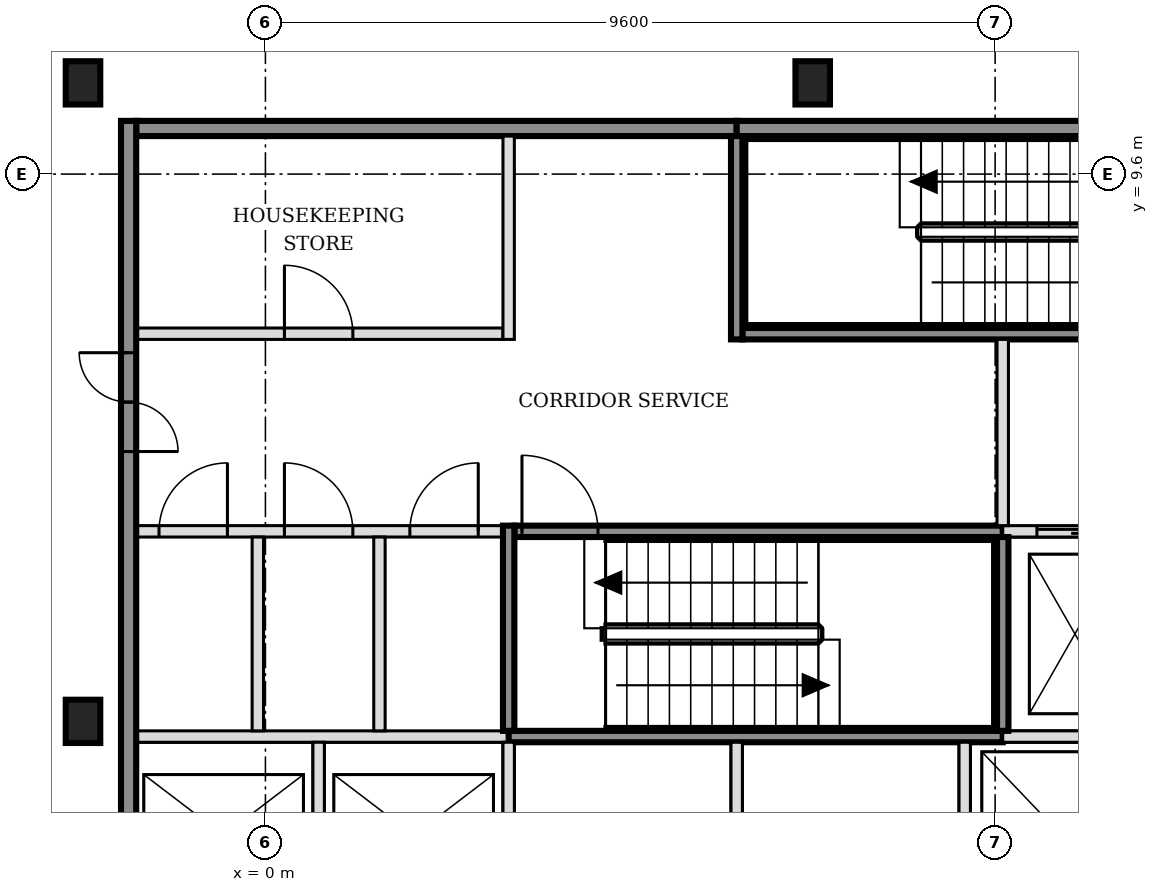
"""IFC4 building model, lengths in metres.
Left out: names, types, materials, properties, quantities, classifications, styles, units other than length and angle.
Written with IfcOpenShell. Run it as: python <this file> out.ifc"""

import sys

from ifc_helpers import new_model, si_unit, direction, frame, frame_2d, origin, origin_2d, place, context, subcontext, project, spatial, rectangle, i_section, extrude, element, fill, save


model = new_model("IFC4")
c1 = context("Model", 3, precision=1e-05, world=origin(), true_north=direction((0.0, 1.0)))
c2 = subcontext(c1, "Body", "Model", "MODEL_VIEW")
j1 = project(units=[si_unit("LENGTHUNIT", "METRE"), si_unit("PLANEANGLEUNIT", "RADIAN")], contexts=[c1])
p1 = place(None, origin())
s1 = spatial("IfcSite", under=j1, at=p1, CompositionType="ELEMENT")
p2 = place(p1, origin())
s2 = spatial("IfcBuilding", under=s1, at=p2, CompositionType="ELEMENT")
p3 = place(p2, frame((0.0, 0.0, 47.4)))
s3 = spatial("IfcBuildingStorey", under=s2, at=p3, CompositionType="ELEMENT", Elevation=47.4)
for number, where, z_axis, x_axis in (
    (1, (-2.4, 2.4, -0.15), (0.0, 0.0, 1.0), (1.0, 0.0, 0.0)),
    (2, (-2.4, 10.8, -0.15), (0.0, 0.0, 1.0), (1.0, 0.0, 0.0)),
    (3, (7.2, 10.8, -0.15), (0.0, 0.0, 1.0), (1.0, 0.0, 0.0)),
):
    element("IfcColumn", number, at=place(p3, frame(where, z_axis=z_axis, x_axis=x_axis)), inside=s3, PredefinedType="COLUMN", context=c2, shape_type="SweptSolid", body=[
        extrude(i_section(OverallWidth=0.454, OverallDepth=0.569, WebThickness=0.078, FlangeThickness=0.125, FilletRadius=0.015, at=origin_2d()), origin(), (0.0, 0.0, 1.0), 3.6),
    ])
p4 = place(p3, frame((-1.7, 2.2, 0.0), z_axis=(0.0, 0.0, 1.0), x_axis=(1.0, 0.0, 0.0)))
e4 = element("IfcWall", 4, at=p4, inside=s3, PredefinedType="SOLIDWALL", context=c2, shape_type="SweptSolid", body=[
    extrude(rectangle(XDim=4.9, YDim=0.15, at=frame_2d((2.45, 0.0))), origin(), (0.0, 0.0, 1.0), 3.45),
])
p5 = place(p3, frame((3.2, 2.2, 0.0), z_axis=(0.0, 0.0, 1.0), x_axis=(1.0, 0.0, 0.0)))
e5 = element("IfcWall", 5, at=p5, inside=s3, PredefinedType="SOLIDWALL", context=c2, shape_type="SweptSolid", body=[
    extrude(rectangle(XDim=6.5, YDim=0.15, at=frame_2d((3.25, 0.0))), origin(), (0.0, 0.0, 1.0), 3.45),
])
p6 = place(p3, frame((9.7, 2.2, 0.0), z_axis=(0.0, 0.0, 1.0), x_axis=(1.0, 0.0, 0.0)))
e6 = element("IfcWall", 6, at=p6, inside=s3, PredefinedType="SOLIDWALL", context=c2, shape_type="SweptSolid", body=[
    extrude(rectangle(XDim=4.525, YDim=0.15, at=frame_2d((2.263, 0.0))), origin(), (0.0, 0.0, 1.0), 3.45),
])
p7 = place(p3, frame((-1.7, 4.9, 0.0), z_axis=(0.0, 0.0, 1.0), x_axis=(1.0, 0.0, 0.0)))
e7 = element("IfcWall", 7, at=p7, inside=s3, PredefinedType="PARTITIONING", context=c2, shape_type="SweptSolid", body=[
    extrude(rectangle(XDim=4.825, YDim=0.15, at=frame_2d((2.413, 0.0))), origin(), (0.0, 0.0, 1.0), 3.45),
])
p8 = place(p7, frame((0.3, 0.0, 0.0)))
e8 = element("IfcOpeningElement", 8, at=p8, cuts=e7, PredefinedType="OPENING", context=c2, shape_type="SweptSolid", body=[
    extrude(rectangle(XDim=0.9, YDim=2.1, at=frame_2d((0.45, 1.05))), frame((0.0, 0.085, 0.0), z_axis=(0.0, -1.0, 0.0), x_axis=(1.0, 0.0, 0.0)), (0.0, 0.0, 1.0), 0.17),
])
p9 = place(p7, frame((1.95, 0.0, 0.0)))
e9 = element("IfcOpeningElement", 9, at=p9, cuts=e7, PredefinedType="OPENING", context=c2, shape_type="SweptSolid", body=[
    extrude(rectangle(XDim=0.9, YDim=2.1, at=frame_2d((0.45, 1.05))), frame((0.0, 0.085, 0.0), z_axis=(0.0, -1.0, 0.0), x_axis=(1.0, 0.0, 0.0)), (0.0, 0.0, 1.0), 0.17),
])
p10 = place(p7, frame((3.6, 0.0, 0.0)))
e10 = element("IfcOpeningElement", 10, at=p10, cuts=e7, PredefinedType="OPENING", context=c2, shape_type="SweptSolid", body=[
    extrude(rectangle(XDim=0.9, YDim=2.1, at=frame_2d((0.45, 1.05))), frame((0.0, 0.085, 0.0), z_axis=(0.0, -1.0, 0.0), x_axis=(1.0, 0.0, 0.0)), (0.0, 0.0, 1.0), 0.17),
])
p11 = place(p3, frame((3.275, 4.9, 0.0), z_axis=(0.0, 0.0, 1.0), x_axis=(1.0, 0.0, 0.0)))
e11 = element("IfcWall", 11, at=p11, inside=s3, PredefinedType="SOLIDWALL", context=c2, shape_type="SweptSolid", body=[
    extrude(rectangle(XDim=6.425, YDim=0.15, at=frame_2d((3.212, 0.0))), origin(), (0.0, 0.0, 1.0), 3.45),
])
p12 = place(p11, frame((0.1, 0.0, 0.0)))
e12 = element("IfcOpeningElement", 12, at=p12, cuts=e11, PredefinedType="OPENING", context=c2, shape_type="SweptSolid", body=[
    extrude(rectangle(XDim=1.0, YDim=2.1, at=frame_2d((0.5, 1.05))), frame((0.0, 0.085, 0.0), z_axis=(0.0, -1.0, 0.0), x_axis=(1.0, 0.0, 0.0)), (0.0, 0.0, 1.0), 0.17),
])
p13 = place(p3, frame((9.7, 4.9, 0.0), z_axis=(0.0, 0.0, 1.0), x_axis=(1.0, 0.0, 0.0)))
e13 = element("IfcWall", 13, at=p13, inside=s3, PredefinedType="SOLIDWALL", context=c2, shape_type="SweptSolid", body=[
    extrude(rectangle(XDim=6.4, YDim=0.15, at=frame_2d((3.2, 0.0))), origin(), (0.0, 0.0, 1.0), 3.45),
])
p14 = place(p13, frame((0.45, 0.0, 0.0)))
e14 = element("IfcOpeningElement", 14, at=p14, cuts=e13, PredefinedType="OPENING", context=c2, shape_type="SweptSolid", body=[
    extrude(rectangle(XDim=1.0, YDim=2.1, at=frame_2d((0.5, 1.05))), frame((0.0, 0.085, 0.0), z_axis=(0.0, -1.0, 0.0), x_axis=(1.0, 0.0, 0.0)), (0.0, 0.0, 1.0), 0.17),
])
p15 = place(p13, frame((2.35, 0.0, 0.0)))
e15 = element("IfcOpeningElement", 15, at=p15, cuts=e13, PredefinedType="OPENING", context=c2, shape_type="SweptSolid", body=[
    extrude(rectangle(XDim=1.0, YDim=2.1, at=frame_2d((0.5, 1.05))), frame((0.0, 0.085, 0.0), z_axis=(0.0, -1.0, 0.0), x_axis=(1.0, 0.0, 0.0)), (0.0, 0.0, 1.0), 0.17),
])
p16 = place(p13, frame((4.7, 0.0, 0.0)))
e16 = element("IfcOpeningElement", 16, at=p16, cuts=e13, PredefinedType="OPENING", context=c2, shape_type="SweptSolid", body=[
    extrude(rectangle(XDim=0.9, YDim=2.1, at=frame_2d((0.45, 1.05))), frame((0.0, 0.085, 0.0), z_axis=(0.0, -1.0, 0.0), x_axis=(1.0, 0.0, 0.0)), (0.0, 0.0, 1.0), 0.17),
])
p17 = place(p3, frame((-1.7, 7.5, 0.0), z_axis=(0.0, 0.0, 1.0), x_axis=(1.0, 0.0, 0.0)))
e17 = element("IfcWall", 17, at=p17, inside=s3, PredefinedType="PARTITIONING", context=c2, shape_type="SweptSolid", body=[
    extrude(rectangle(XDim=4.825, YDim=0.15, at=frame_2d((2.413, 0.0))), origin(), (0.0, 0.0, 1.0), 3.45),
])
p18 = place(p17, frame((1.95, 0.0, 0.0)))
e18 = element("IfcOpeningElement", 18, at=p18, cuts=e17, PredefinedType="OPENING", context=c2, shape_type="SweptSolid", body=[
    extrude(rectangle(XDim=0.9, YDim=2.1, at=frame_2d((0.45, 1.05))), frame((0.0, 0.085, 0.0), z_axis=(0.0, -1.0, 0.0), x_axis=(1.0, 0.0, 0.0)), (0.0, 0.0, 1.0), 0.17),
])
p19 = place(p3, frame((6.275, 7.5, 0.0), z_axis=(0.0, 0.0, 1.0), x_axis=(1.0, 0.0, 0.0)))
e19 = element("IfcWall", 19, at=p19, inside=s3, PredefinedType="SOLIDWALL", context=c2, shape_type="SweptSolid", body=[
    extrude(rectangle(XDim=6.425, YDim=0.15, at=frame_2d((3.212, 0.0))), origin(), (0.0, 0.0, 1.0), 3.45),
])
p20 = place(p19, frame((5.225, 0.0, 0.0)))
e20 = element("IfcOpeningElement", 20, at=p20, cuts=e19, PredefinedType="OPENING", context=c2, shape_type="SweptSolid", body=[
    extrude(rectangle(XDim=1.0, YDim=2.1, at=frame_2d((0.5, 1.05))), frame((0.0, 0.085, 0.0), z_axis=(0.0, -1.0, 0.0), x_axis=(1.0, 0.0, 0.0)), (0.0, 0.0, 1.0), 0.17),
])
p21 = place(p3, frame((-1.7, 10.2, 0.0), z_axis=(0.0, 0.0, 1.0), x_axis=(1.0, 0.0, 0.0)))
e21 = element("IfcWall", 21, at=p21, inside=s3, PredefinedType="SOLIDWALL", context=c2, shape_type="SweptSolid", body=[
    extrude(rectangle(XDim=7.9, YDim=0.2, at=frame_2d((3.95, 0.0))), origin(), (0.0, 0.0, 1.0), 3.45),
])
p22 = place(p3, frame((6.2, 10.2, 0.0), z_axis=(0.0, 0.0, 1.0), x_axis=(1.0, 0.0, 0.0)))
e22 = element("IfcWall", 22, at=p22, inside=s3, PredefinedType="SOLIDWALL", context=c2, shape_type="SweptSolid", body=[
    extrude(rectangle(XDim=6.5, YDim=0.2, at=frame_2d((3.25, 0.0))), origin(), (0.0, 0.0, 1.0), 3.45),
])
p23 = place(p3, frame((-1.8, -5.5, 0.0), z_axis=(0.0, 0.0, 1.0), x_axis=(0.0, 1.0, 0.0)))
e23 = element("IfcWall", 23, at=p23, inside=s3, PredefinedType="SOLIDWALL", context=c2, shape_type="SweptSolid", body=[
    extrude(rectangle(XDim=15.8, YDim=0.2, at=frame_2d((7.9, 0.0))), origin(), (0.0, 0.0, 1.0), 3.45),
])
p24 = place(p23, frame((3.05, 0.0, 0.0)))
e24 = element("IfcOpeningElement", 24, at=p24, cuts=e23, PredefinedType="OPENING", context=c2, shape_type="SweptSolid", body=[
    extrude(rectangle(XDim=1.3, YDim=2.1, at=frame_2d((0.65, 1.05))), frame((0.0, 0.11, 0.0), z_axis=(0.0, -1.0, 0.0), x_axis=(1.0, 0.0, 0.0)), (0.0, 0.0, 1.0), 0.22),
])
p25 = place(p23, frame((11.45, 0.0, 0.0)))
e25 = element("IfcOpeningElement", 25, at=p25, cuts=e23, PredefinedType="OPENING", context=c2, shape_type="SweptSolid", body=[
    extrude(rectangle(XDim=1.3, YDim=2.1, at=frame_2d((0.65, 1.05))), frame((0.0, 0.11, 0.0), z_axis=(0.0, -1.0, 0.0), x_axis=(1.0, 0.0, 0.0)), (0.0, 0.0, 1.0), 0.22),
])
p26 = place(p3, frame((-0.1, 2.275, 0.0), z_axis=(0.0, 0.0, 1.0), x_axis=(0.0, 1.0, 0.0)))
e26 = element("IfcWall", 26, at=p26, inside=s3, PredefinedType="PARTITIONING", context=c2, shape_type="SweptSolid", body=[
    extrude(rectangle(XDim=2.55, YDim=0.15, at=frame_2d((1.275, 0.0))), origin(), (0.0, 0.0, 1.0), 3.45),
])
p27 = place(p3, frame((0.7, -0.325, 0.0), z_axis=(0.0, 0.0, 1.0), x_axis=(0.0, 1.0, 0.0)))
e27 = element("IfcWall", 27, at=p27, inside=s3, PredefinedType="SOLIDWALL", context=c2, shape_type="SweptSolid", body=[
    extrude(rectangle(XDim=2.45, YDim=0.15, at=frame_2d((1.225, 0.0))), origin(), (0.0, 0.0, 1.0), 3.45),
])
p28 = place(p3, frame((1.5, 2.275, 0.0), z_axis=(0.0, 0.0, 1.0), x_axis=(0.0, 1.0, 0.0)))
e28 = element("IfcWall", 28, at=p28, inside=s3, PredefinedType="PARTITIONING", context=c2, shape_type="SweptSolid", body=[
    extrude(rectangle(XDim=2.55, YDim=0.15, at=frame_2d((1.275, 0.0))), origin(), (0.0, 0.0, 1.0), 3.45),
])
p29 = place(p3, frame((3.2, -0.325, 0.0), z_axis=(0.0, 0.0, 1.0), x_axis=(0.0, 1.0, 0.0)))
e29 = element("IfcWall", 29, at=p29, inside=s3, PredefinedType="SOLIDWALL", context=c2, shape_type="SweptSolid", body=[
    extrude(rectangle(XDim=2.45, YDim=0.15, at=frame_2d((1.225, 0.0))), origin(), (0.0, 0.0, 1.0), 3.45),
])
p30 = place(p3, frame((3.2, 2.275, 0.0), z_axis=(0.0, 0.0, 1.0), x_axis=(0.0, 1.0, 0.0)))
e30 = element("IfcWall", 30, at=p30, inside=s3, PredefinedType="SOLIDWALL", context=c2, shape_type="SweptSolid", body=[
    extrude(rectangle(XDim=2.7, YDim=0.15, at=frame_2d((1.35, 0.0))), origin(), (0.0, 0.0, 1.0), 3.45),
])
p31 = place(p3, frame((3.2, 7.425, 0.0), z_axis=(0.0, 0.0, 1.0), x_axis=(0.0, 1.0, 0.0)))
e31 = element("IfcWall", 31, at=p31, inside=s3, PredefinedType="PARTITIONING", context=c2, shape_type="SweptSolid", body=[
    extrude(rectangle(XDim=2.675, YDim=0.15, at=frame_2d((1.337, 0.0))), origin(), (0.0, 0.0, 1.0), 3.45),
])
p32 = place(p3, frame((6.2, -0.325, 0.0), z_axis=(0.0, 0.0, 1.0), x_axis=(0.0, 1.0, 0.0)))
e32 = element("IfcWall", 32, at=p32, inside=s3, PredefinedType="SOLIDWALL", context=c2, shape_type="SweptSolid", body=[
    extrude(rectangle(XDim=2.45, YDim=0.15, at=frame_2d((1.225, 0.0))), origin(), (0.0, 0.0, 1.0), 3.45),
])
p33 = place(p3, frame((6.2, 7.425, 0.0), z_axis=(0.0, 0.0, 1.0), x_axis=(0.0, 1.0, 0.0)))
e33 = element("IfcWall", 33, at=p33, inside=s3, PredefinedType="SOLIDWALL", context=c2, shape_type="SweptSolid", body=[
    extrude(rectangle(XDim=2.675, YDim=0.15, at=frame_2d((1.337, 0.0))), origin(), (0.0, 0.0, 1.0), 3.45),
])
p34 = place(p3, frame((9.2, -0.325, 0.0), z_axis=(0.0, 0.0, 1.0), x_axis=(0.0, 1.0, 0.0)))
e34 = element("IfcWall", 34, at=p34, inside=s3, PredefinedType="SOLIDWALL", context=c2, shape_type="SweptSolid", body=[
    extrude(rectangle(XDim=2.45, YDim=0.15, at=frame_2d((1.225, 0.0))), origin(), (0.0, 0.0, 1.0), 3.45),
])
p35 = place(p3, frame((9.7, 2.275, 0.0), z_axis=(0.0, 0.0, 1.0), x_axis=(0.0, 1.0, 0.0)))
e35 = element("IfcWall", 35, at=p35, inside=s3, PredefinedType="SOLIDWALL", context=c2, shape_type="SweptSolid", body=[
    extrude(rectangle(XDim=2.55, YDim=0.15, at=frame_2d((1.275, 0.0))), origin(), (0.0, 0.0, 1.0), 3.45),
])
p36 = place(p3, frame((9.7, 4.975, 0.0), z_axis=(0.0, 0.0, 1.0), x_axis=(0.0, 1.0, 0.0)))
e36 = element("IfcWall", 36, at=p36, inside=s3, PredefinedType="SOLIDWALL", context=c2, shape_type="SweptSolid", body=[
    extrude(rectangle(XDim=2.45, YDim=0.15, at=frame_2d((1.225, 0.0))), origin(), (0.0, 0.0, 1.0), 3.45),
])
p37 = place(p14, origin())
e37 = element("IfcDoor", 37, at=p37, inside=s3, OperationType="DOUBLE_DOOR_SLIDING", PredefinedType="DOOR", context=c2, shape_type="SweptSolid", body=[
    extrude(rectangle(XDim=1.0, YDim=2.1, at=frame_2d((0.5, 1.05))), frame((0.0, 0.025, 0.0), z_axis=(0.0, -1.0, 0.0), x_axis=(1.0, 0.0, 0.0)), (0.0, 0.0, 1.0), 0.05),
])
fill(e14, e37)
p38 = place(p12, origin())
e38 = element("IfcDoor", 38, at=p38, inside=s3, OperationType="SINGLE_SWING_LEFT", PredefinedType="DOOR", context=c2, shape_type="SweptSolid", body=[
    extrude(rectangle(XDim=1.0, YDim=2.1, at=frame_2d((0.5, 1.05))), frame((0.0, 0.025, 0.0), z_axis=(0.0, -1.0, 0.0), x_axis=(1.0, 0.0, 0.0)), (0.0, 0.0, 1.0), 0.05),
])
fill(e12, e38)
p39 = place(p25, origin())
e39 = element("IfcDoor", 39, at=p39, inside=s3, OperationType="DOUBLE_DOOR_SINGLE_SWING", PredefinedType="DOOR", context=c2, shape_type="SweptSolid", body=[
    extrude(rectangle(XDim=1.3, YDim=2.1, at=frame_2d((0.65, 1.05))), frame((0.0, 0.025, 0.0), z_axis=(0.0, -1.0, 0.0), x_axis=(1.0, 0.0, 0.0)), (0.0, 0.0, 1.0), 0.05),
])
fill(e25, e39)
p40 = place(p8, origin())
e40 = element("IfcDoor", 40, at=p40, inside=s3, OperationType="SINGLE_SWING_RIGHT", PredefinedType="DOOR", context=c2, shape_type="SweptSolid", body=[
    extrude(rectangle(XDim=0.9, YDim=2.1, at=frame_2d((0.45, 1.05))), frame((0.0, 0.025, 0.0), z_axis=(0.0, -1.0, 0.0), x_axis=(1.0, 0.0, 0.0)), (0.0, 0.0, 1.0), 0.05),
])
fill(e8, e40)
p41 = place(p9, origin())
e41 = element("IfcDoor", 41, at=p41, inside=s3, OperationType="SINGLE_SWING_LEFT", PredefinedType="DOOR", context=c2, shape_type="SweptSolid", body=[
    extrude(rectangle(XDim=0.9, YDim=2.1, at=frame_2d((0.45, 1.05))), frame((0.0, 0.025, 0.0), z_axis=(0.0, -1.0, 0.0), x_axis=(1.0, 0.0, 0.0)), (0.0, 0.0, 1.0), 0.05),
])
fill(e9, e41)
p42 = place(p10, origin())
e42 = element("IfcDoor", 42, at=p42, inside=s3, OperationType="SINGLE_SWING_RIGHT", PredefinedType="DOOR", context=c2, shape_type="SweptSolid", body=[
    extrude(rectangle(XDim=0.9, YDim=2.1, at=frame_2d((0.45, 1.05))), frame((0.0, 0.025, 0.0), z_axis=(0.0, -1.0, 0.0), x_axis=(1.0, 0.0, 0.0)), (0.0, 0.0, 1.0), 0.05),
])
fill(e10, e42)
p43 = place(p18, origin())
e43 = element("IfcDoor", 43, at=p43, inside=s3, OperationType="SINGLE_SWING_LEFT", PredefinedType="DOOR", context=c2, shape_type="SweptSolid", body=[
    extrude(rectangle(XDim=0.9, YDim=2.1, at=frame_2d((0.45, 1.05))), frame((0.0, 0.025, 0.0), z_axis=(0.0, -1.0, 0.0), x_axis=(1.0, 0.0, 0.0)), (0.0, 0.0, 1.0), 0.05),
])
fill(e18, e43)
save(model, sys.argv[1])
